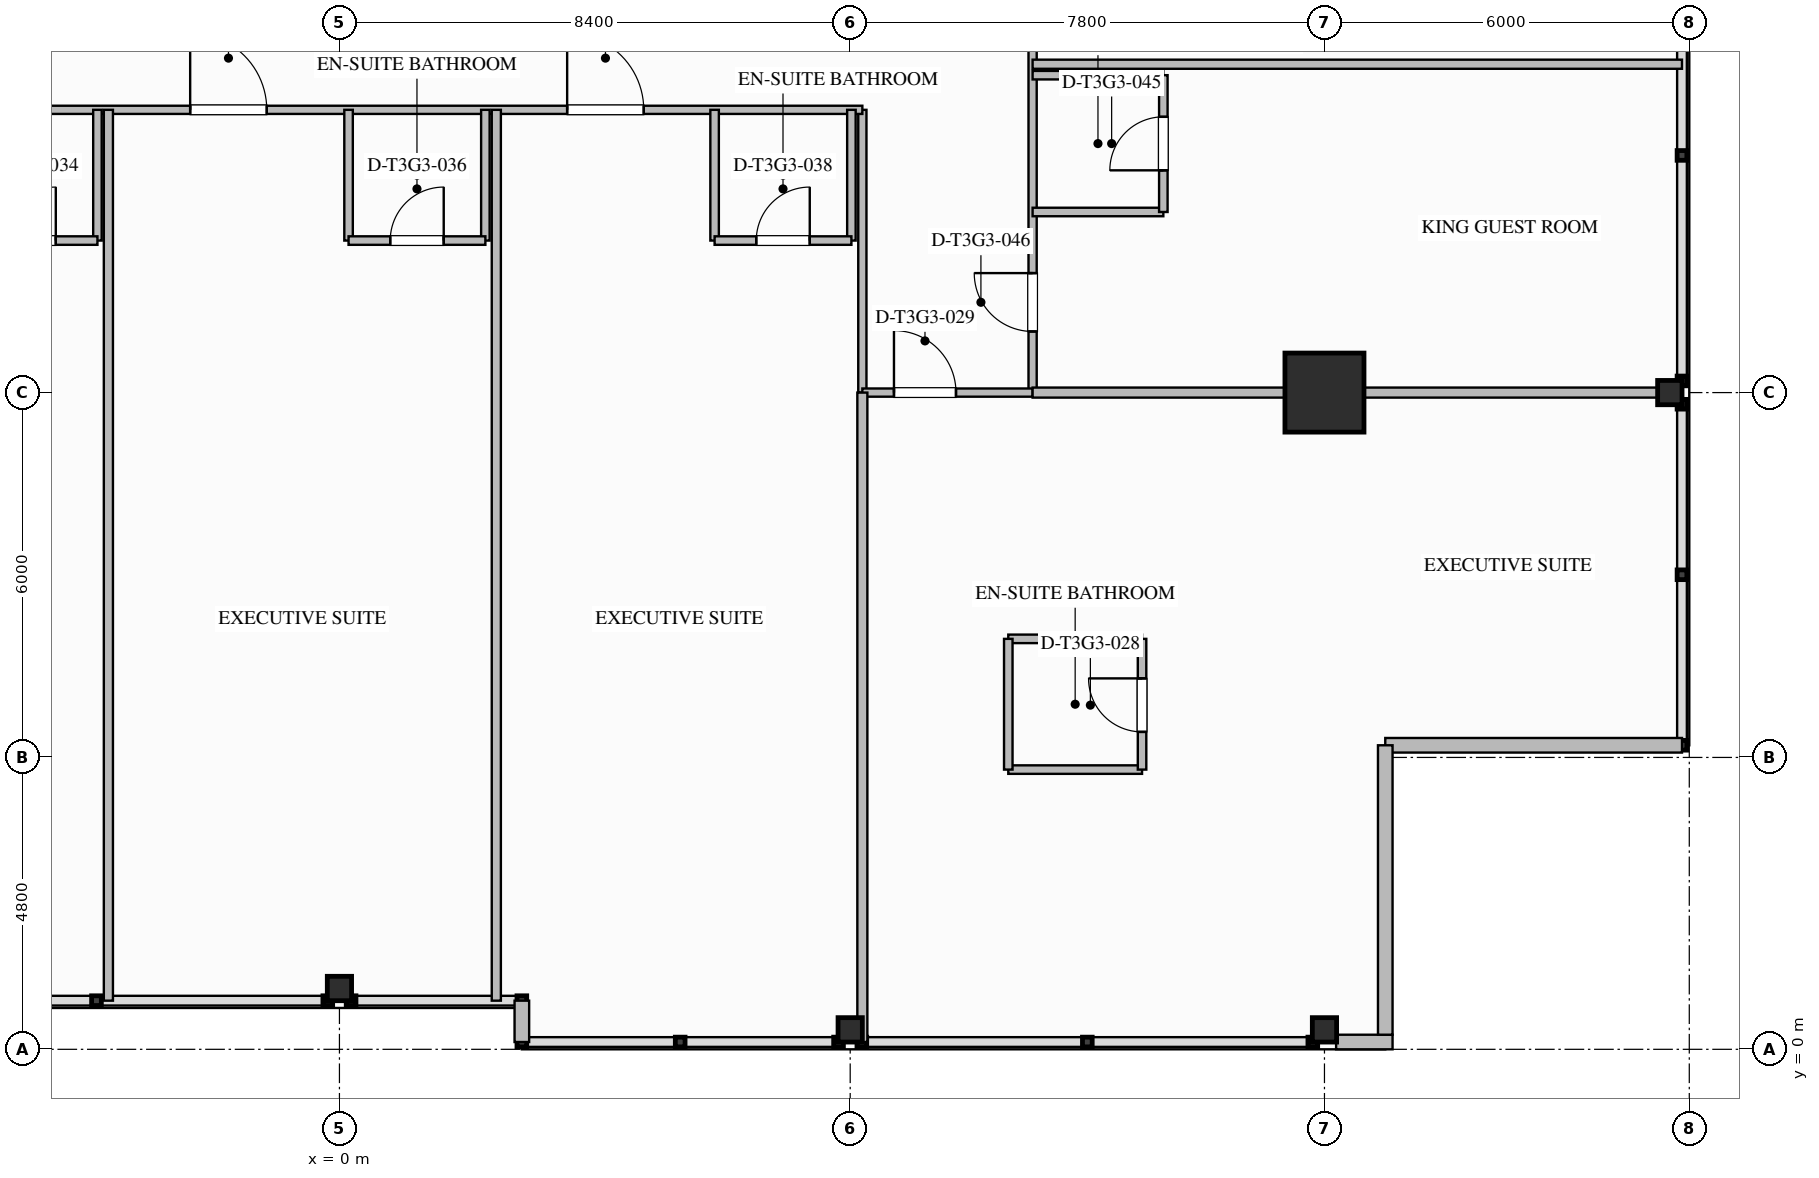
"""IFC4 building model, lengths in metres.
Left out: names, types, materials, properties, quantities, classifications, styles, units other than length and angle.
Written with IfcOpenShell. Run it as: python <this file> out.ifc"""

import sys

from ifc_helpers import new_model, si_unit, direction, frame, frame_2d, origin, origin_2d, place, context, subcontext, project, spatial, rectangle, i_section, extrude, element, fill, save


model = new_model("IFC4")
c1 = context("Model", 3, precision=1e-05, world=origin(), true_north=direction((0.0, 1.0)))
c2 = subcontext(c1, "Body", "Model", "MODEL_VIEW")
j1 = project(units=[si_unit("LENGTHUNIT", "METRE"), si_unit("PLANEANGLEUNIT", "RADIAN")], contexts=[c1])
p1 = place(None, origin())
s1 = spatial("IfcSite", under=j1, at=p1, CompositionType="ELEMENT")
p2 = place(p1, origin())
s2 = spatial("IfcBuilding", under=s1, at=p2, CompositionType="ELEMENT")
p3 = place(p2, frame((0.0, 0.0, 178.8)))
s3 = spatial("IfcBuildingStorey", under=s2, at=p3, CompositionType="ELEMENT", Elevation=178.8)
p4 = place(p3, frame((16.2, 10.8, 0.0), z_axis=(0.0, 0.0, 1.0), x_axis=(1.0, 0.0, 0.0)))
e1 = element("IfcColumn", 1, at=p4, inside=s3, PredefinedType="COLUMN", context=c2, shape_type="SweptSolid", body=[
    extrude(rectangle(XDim=1.3, YDim=1.3, at=origin_2d()), origin(), (0.0, 0.0, 1.0), 3.55),
])
for number, where, z_axis, x_axis in (
    (2, (21.88, 10.8, 0.0), (0.0, 0.0, 1.0), (1.0, 0.0, 0.0)),
    (3, (0.0, 1.0, 0.0), (0.0, 0.0, 1.0), (0.0, 1.0, 0.0)),
    (4, (8.4, 0.32, 0.0), (0.0, 0.0, 1.0), (0.0, 1.0, 0.0)),
    (5, (16.2, 0.32, 0.0), (0.0, 0.0, 1.0), (0.0, 1.0, 0.0)),
):
    element("IfcColumn", number, at=place(p3, frame(where, z_axis=z_axis, x_axis=x_axis)), inside=s3, PredefinedType="COLUMN", context=c2, shape_type="SweptSolid", body=[
        extrude(i_section(OverallWidth=0.401, OverallDepth=0.399, WebThickness=0.025, FlangeThickness=0.04, FilletRadius=0.025, at=origin_2d()), origin(), (0.0, 0.0, 1.0), 3.547),
    ])
p5 = place(p3, frame((17.32, 0.12, 0.0), z_axis=(0.0, 0.0, 1.0), x_axis=(-1.0, 0.0, 0.0)))
e6 = element("IfcWall", 6, at=p5, inside=s3, PredefinedType="STANDARD", context=c2, shape_type="SweptSolid", body=[
    extrude(rectangle(XDim=0.928, YDim=0.24, at=frame_2d((0.464, 0.0))), origin(), (0.0, 0.0, 1.0), 3.29),
])
p6 = place(p3, frame((22.08, 5.0, 0.0), z_axis=(0.0, 0.0, 1.0), x_axis=(-1.0, 0.0, 0.0)))
e7 = element("IfcWall", 7, at=p6, inside=s3, PredefinedType="STANDARD", context=c2, shape_type="SweptSolid", body=[
    extrude(rectangle(XDim=4.88, YDim=0.24, at=frame_2d((2.44, 0.0))), origin(), (0.0, 0.0, 1.0), 3.29),
])
p7 = place(p3, frame((17.2, 5.0, 0.0), z_axis=(0.0, 0.0, 1.0), x_axis=(0.0, -1.0, 0.0)))
e8 = element("IfcWall", 8, at=p7, inside=s3, PredefinedType="STANDARD", context=c2, shape_type="SweptSolid", body=[
    extrude(rectangle(XDim=4.76, YDim=0.24, at=frame_2d((2.38, 0.0))), origin(), (0.0, 0.0, 1.0), 3.29),
])
p8 = place(p3, frame((3.0, 0.12, 0.0), z_axis=(0.0, 0.0, 1.0), x_axis=(0.0, 1.0, 0.0)))
e9 = element("IfcWall", 9, at=p8, inside=s3, PredefinedType="STANDARD", context=c2, shape_type="SweptSolid", body=[
    extrude(rectangle(XDim=0.68, YDim=0.24, at=frame_2d((0.34, 0.0))), origin(), (0.0, 0.0, 1.0), 3.29),
])
p9 = place(p3, frame((8.6, 10.8, 0.0), z_axis=(0.0, 0.0, 1.0), x_axis=(0.0, 1.0, 0.0)))
e10 = element("IfcWall", 10, at=p9, inside=s3, PredefinedType="PARTITIONING", context=c2, shape_type="SweptSolid", body=[
    extrude(rectangle(XDim=4.65, YDim=0.135, at=frame_2d((2.325, 0.0))), origin(), (0.0, 0.0, 1.0), 2.667),
])
p10 = place(p3, frame((-16.2, 15.45, 0.0), z_axis=(0.0, 0.0, 1.0), x_axis=(1.0, 0.0, 0.0)))
e11 = element("IfcWall", 11, at=p10, inside=s3, PredefinedType="PARTITIONING", context=c2, shape_type="SweptSolid", body=[
    extrude(rectangle(XDim=24.8, YDim=0.135, at=frame_2d((12.4, 0.0))), origin(), (0.0, 0.0, 1.0), 3.29),
])
p11 = place(p10, frame((1.875, 0.0, 0.0)))
e12 = element("IfcOpeningElement", 12, at=p11, cuts=e11, PredefinedType="OPENING", context=c2, shape_type="SweptSolid", body=[
    extrude(rectangle(XDim=1.26, YDim=2.2, at=frame_2d((0.63, 1.1))), frame((0.0, 0.077, 0.0), z_axis=(0.0, -1.0, 0.0), x_axis=(1.0, 0.0, 0.0)), (0.0, 0.0, 1.0), 0.155),
])
p12 = place(p10, frame((8.225, 0.0, 0.0)))
e13 = element("IfcOpeningElement", 13, at=p12, cuts=e11, PredefinedType="OPENING", context=c2, shape_type="SweptSolid", body=[
    extrude(rectangle(XDim=0.96, YDim=2.15, at=frame_2d((0.48, 1.075))), frame((0.0, 0.077, 0.0), z_axis=(0.0, -1.0, 0.0), x_axis=(1.0, 0.0, 0.0)), (0.0, 0.0, 1.0), 0.155),
])
p13 = place(p10, frame((13.745, 0.0, 0.0)))
e14 = element("IfcOpeningElement", 14, at=p13, cuts=e11, PredefinedType="OPENING", context=c2, shape_type="SweptSolid", body=[
    extrude(rectangle(XDim=1.26, YDim=2.2, at=frame_2d((0.63, 1.1))), frame((0.0, 0.077, 0.0), z_axis=(0.0, -1.0, 0.0), x_axis=(1.0, 0.0, 0.0)), (0.0, 0.0, 1.0), 0.155),
])
p14 = place(p10, frame((19.945, 0.0, 0.0)))
e15 = element("IfcOpeningElement", 15, at=p14, cuts=e11, PredefinedType="OPENING", context=c2, shape_type="SweptSolid", body=[
    extrude(rectangle(XDim=1.26, YDim=2.2, at=frame_2d((0.63, 1.1))), frame((0.0, 0.077, 0.0), z_axis=(0.0, -1.0, 0.0), x_axis=(1.0, 0.0, 0.0)), (0.0, 0.0, 1.0), 0.155),
])
p15 = place(p3, frame((11.4, 10.8, 0.0), z_axis=(0.0, 0.0, 1.0), x_axis=(0.0, 1.0, 0.0)))
e16 = element("IfcWall", 16, at=p15, inside=s3, PredefinedType="PARTITIONING", context=c2, shape_type="SweptSolid", body=[
    extrude(rectangle(XDim=32.4, YDim=0.135, at=frame_2d((16.2, 0.0))), origin(), (0.0, 0.0, 1.0), 3.29),
])
p16 = place(p15, frame((1.005, 0.0, 0.0)))
e17 = element("IfcOpeningElement", 17, at=p16, cuts=e16, PredefinedType="OPENING", context=c2, shape_type="SweptSolid", body=[
    extrude(rectangle(XDim=0.96, YDim=2.15, at=frame_2d((0.48, 1.075))), frame((0.0, 0.077, 0.0), z_axis=(0.0, -1.0, 0.0), x_axis=(1.0, 0.0, 0.0)), (0.0, 0.0, 1.0), 0.155),
])
p17 = place(p15, frame((8.94, 0.0, 0.0)))
e18 = element("IfcOpeningElement", 18, at=p17, cuts=e16, PredefinedType="OPENING", context=c2, shape_type="SweptSolid", body=[
    extrude(rectangle(XDim=1.02, YDim=2.15, at=frame_2d((0.51, 1.075))), frame((0.0, 0.077, 0.0), z_axis=(0.0, -1.0, 0.0), x_axis=(1.0, 0.0, 0.0)), (0.0, 0.0, 1.0), 0.155),
])
p18 = place(p15, frame((14.445, 0.0, 0.0)))
e19 = element("IfcOpeningElement", 19, at=p18, cuts=e16, PredefinedType="OPENING", context=c2, shape_type="SweptSolid", body=[
    extrude(rectangle(XDim=0.96, YDim=2.15, at=frame_2d((0.48, 1.075))), frame((0.0, 0.077, 0.0), z_axis=(0.0, -1.0, 0.0), x_axis=(1.0, 0.0, 0.0)), (0.0, 0.0, 1.0), 0.155),
])
p19 = place(p15, frame((22.38, 0.0, 0.0)))
e20 = element("IfcOpeningElement", 20, at=p19, cuts=e16, PredefinedType="OPENING", context=c2, shape_type="SweptSolid", body=[
    extrude(rectangle(XDim=1.02, YDim=2.15, at=frame_2d((0.51, 1.075))), frame((0.0, 0.077, 0.0), z_axis=(0.0, -1.0, 0.0), x_axis=(1.0, 0.0, 0.0)), (0.0, 0.0, 1.0), 0.155),
])
p20 = place(p15, frame((28.005, 0.0, 0.0)))
e21 = element("IfcOpeningElement", 21, at=p20, cuts=e16, PredefinedType="OPENING", context=c2, shape_type="SweptSolid", body=[
    extrude(rectangle(XDim=0.96, YDim=2.15, at=frame_2d((0.48, 1.075))), frame((0.0, 0.077, 0.0), z_axis=(0.0, -1.0, 0.0), x_axis=(1.0, 0.0, 0.0)), (0.0, 0.0, 1.0), 0.155),
])
p21 = place(p3, frame((8.6, 10.8, 0.0), z_axis=(0.0, 0.0, 1.0), x_axis=(1.0, 0.0, 0.0)))
e22 = element("IfcWall", 22, at=p21, inside=s3, PredefinedType="PARTITIONING", context=c2, shape_type="SweptSolid", body=[
    extrude(rectangle(XDim=2.8, YDim=0.135, at=frame_2d((1.4, 0.0))), origin(), (0.0, 0.0, 1.0), 2.58),
])
p22 = place(p21, frame((0.52, 0.0, 0.0)))
e23 = element("IfcOpeningElement", 23, at=p22, cuts=e22, PredefinedType="OPENING", context=c2, shape_type="SweptSolid", body=[
    extrude(rectangle(XDim=1.02, YDim=2.15, at=frame_2d((0.51, 1.075))), frame((0.0, 0.077, 0.0), z_axis=(0.0, -1.0, 0.0), x_axis=(1.0, 0.0, 0.0)), (0.0, 0.0, 1.0), 0.155),
])
p23 = place(p3, frame((8.6, 0.12, 0.0), z_axis=(0.0, 0.0, 1.0), x_axis=(0.0, 1.0, 0.0)))
e24 = element("IfcWall", 24, at=p23, inside=s3, PredefinedType="PARTITIONING", context=c2, shape_type="SweptSolid", body=[
    extrude(rectangle(XDim=10.68, YDim=0.165, at=frame_2d((5.34, 0.0))), origin(), (0.0, 0.0, 1.0), 2.58),
])
p24 = place(p3, frame((11.4, 10.8, 0.0), z_axis=(0.0, 0.0, 1.0), x_axis=(1.0, 0.0, 0.0)))
e25 = element("IfcWall", 25, at=p24, inside=s3, PredefinedType="PARTITIONING", context=c2, shape_type="SweptSolid", body=[
    extrude(rectangle(XDim=10.68, YDim=0.165, at=frame_2d((5.34, 0.0))), origin(), (0.0, 0.0, 1.0), 2.58),
])
for number, where, z_axis, x_axis in (
    (26, (11.0, 4.6, 0.0), (0.0, 0.0, 1.0), (1.0, 0.0, 0.0)),
    (27, (11.0, 6.75, 0.0), (0.0, 0.0, 1.0), (1.0, 0.0, 0.0)),
):
    element("IfcWall", number, at=place(p3, frame(where, z_axis=z_axis, x_axis=x_axis)), inside=s3, PredefinedType="PLUMBINGWALL", context=c2, shape_type="SweptSolid", body=[
        extrude(rectangle(XDim=2.2, YDim=0.14, at=frame_2d((1.1, 0.0))), origin(), (0.0, 0.0, 1.0), 3.29),
    ])
p25 = place(p3, frame((11.0, 4.6, 0.0), z_axis=(0.0, 0.0, 1.0), x_axis=(0.0, 1.0, 0.0)))
e28 = element("IfcWall", 28, at=p25, inside=s3, PredefinedType="PLUMBINGWALL", context=c2, shape_type="SweptSolid", body=[
    extrude(rectangle(XDim=2.15, YDim=0.14, at=frame_2d((1.075, 0.0))), origin(), (0.0, 0.0, 1.0), 3.29),
])
p26 = place(p3, frame((13.2, 4.6, 0.0), z_axis=(0.0, 0.0, 1.0), x_axis=(0.0, 1.0, 0.0)))
e29 = element("IfcWall", 29, at=p26, inside=s3, PredefinedType="PLUMBINGWALL", context=c2, shape_type="SweptSolid", body=[
    extrude(rectangle(XDim=2.15, YDim=0.14, at=frame_2d((1.075, 0.0))), origin(), (0.0, 0.0, 1.0), 3.29),
])
p27 = place(p26, frame((0.62, 0.0, 0.0)))
e30 = element("IfcOpeningElement", 30, at=p27, cuts=e29, PredefinedType="OPENING", context=c2, shape_type="SweptSolid", body=[
    extrude(rectangle(XDim=0.88, YDim=2.1, at=frame_2d((0.44, 1.05))), frame((0.0, 0.08, 0.0), z_axis=(0.0, -1.0, 0.0), x_axis=(1.0, 0.0, 0.0)), (0.0, 0.0, 1.0), 0.16),
])
p28 = place(p3, frame((-3.98, 15.45, 0.0), z_axis=(0.0, 0.0, 1.0), x_axis=(0.0, -1.0, 0.0)))
e31 = element("IfcWall", 31, at=p28, inside=s3, PredefinedType="PLUMBINGWALL", context=c2, shape_type="SweptSolid", body=[
    extrude(rectangle(XDim=2.15, YDim=0.14, at=frame_2d((1.075, 0.0))), origin(), (0.0, 0.0, 1.0), 3.29),
])
p29 = place(p3, frame((-6.23, 13.3, 0.0), z_axis=(0.0, 0.0, 1.0), x_axis=(1.0, 0.0, 0.0)))
e32 = element("IfcWall", 32, at=p29, inside=s3, PredefinedType="PLUMBINGWALL", context=c2, shape_type="SweptSolid", body=[
    extrude(rectangle(XDim=2.25, YDim=0.14, at=frame_2d((1.125, 0.0))), origin(), (0.0, 0.0, 1.0), 3.29),
])
p30 = place(p29, frame((0.685, 0.0, 0.0)))
e33 = element("IfcOpeningElement", 33, at=p30, cuts=e32, PredefinedType="OPENING", context=c2, shape_type="SweptSolid", body=[
    extrude(rectangle(XDim=0.88, YDim=2.1, at=frame_2d((0.44, 1.05))), frame((0.0, 0.08, 0.0), z_axis=(0.0, -1.0, 0.0), x_axis=(1.0, 0.0, 0.0)), (0.0, 0.0, 1.0), 0.16),
])
p31 = place(p3, frame((-3.8, 0.8, 0.0), z_axis=(0.0, 0.0, 1.0), x_axis=(0.0, 1.0, 0.0)))
e34 = element("IfcWall", 34, at=p31, inside=s3, PredefinedType="PARTITIONING", context=c2, shape_type="SweptSolid", body=[
    extrude(rectangle(XDim=14.65, YDim=0.15, at=frame_2d((7.325, 0.0))), origin(), (0.0, 0.0, 1.0), 3.29),
])
p32 = place(p3, frame((0.15, 15.45, 0.0), z_axis=(0.0, 0.0, 1.0), x_axis=(0.0, -1.0, 0.0)))
e35 = element("IfcWall", 35, at=p32, inside=s3, PredefinedType="PLUMBINGWALL", context=c2, shape_type="SweptSolid", body=[
    extrude(rectangle(XDim=2.15, YDim=0.14, at=frame_2d((1.075, 0.0))), origin(), (0.0, 0.0, 1.0), 2.667),
])
p33 = place(p3, frame((2.4, 15.45, 0.0), z_axis=(0.0, 0.0, 1.0), x_axis=(0.0, -1.0, 0.0)))
e36 = element("IfcWall", 36, at=p33, inside=s3, PredefinedType="PLUMBINGWALL", context=c2, shape_type="SweptSolid", body=[
    extrude(rectangle(XDim=2.15, YDim=0.14, at=frame_2d((1.075, 0.0))), origin(), (0.0, 0.0, 1.0), 3.29),
])
p34 = place(p3, frame((0.15, 13.3, 0.0), z_axis=(0.0, 0.0, 1.0), x_axis=(1.0, 0.0, 0.0)))
e37 = element("IfcWall", 37, at=p34, inside=s3, PredefinedType="PLUMBINGWALL", context=c2, shape_type="SweptSolid", body=[
    extrude(rectangle(XDim=2.25, YDim=0.14, at=frame_2d((1.125, 0.0))), origin(), (0.0, 0.0, 1.0), 3.29),
])
p35 = place(p34, frame((0.685, 0.0, 0.0)))
e38 = element("IfcOpeningElement", 38, at=p35, cuts=e37, PredefinedType="OPENING", context=c2, shape_type="SweptSolid", body=[
    extrude(rectangle(XDim=0.88, YDim=2.1, at=frame_2d((0.44, 1.05))), frame((0.0, 0.08, 0.0), z_axis=(0.0, -1.0, 0.0), x_axis=(1.0, 0.0, 0.0)), (0.0, 0.0, 1.0), 0.16),
])
p36 = place(p3, frame((2.58, 0.8, 0.0), z_axis=(0.0, 0.0, 1.0), x_axis=(0.0, 1.0, 0.0)))
e39 = element("IfcWall", 39, at=p36, inside=s3, PredefinedType="PARTITIONING", context=c2, shape_type="SweptSolid", body=[
    extrude(rectangle(XDim=14.65, YDim=0.15, at=frame_2d((7.325, 0.0))), origin(), (0.0, 0.0, 1.0), 3.29),
])
p37 = place(p3, frame((6.17, 15.45, 0.0), z_axis=(0.0, 0.0, 1.0), x_axis=(0.0, -1.0, 0.0)))
e40 = element("IfcWall", 40, at=p37, inside=s3, PredefinedType="PLUMBINGWALL", context=c2, shape_type="SweptSolid", body=[
    extrude(rectangle(XDim=2.15, YDim=0.14, at=frame_2d((1.075, 0.0))), origin(), (0.0, 0.0, 1.0), 3.29),
])
p38 = place(p3, frame((8.42, 15.45, 0.0), z_axis=(0.0, 0.0, 1.0), x_axis=(0.0, -1.0, 0.0)))
e41 = element("IfcWall", 41, at=p38, inside=s3, PredefinedType="PLUMBINGWALL", context=c2, shape_type="SweptSolid", body=[
    extrude(rectangle(XDim=2.15, YDim=0.14, at=frame_2d((1.075, 0.0))), origin(), (0.0, 0.0, 1.0), 2.667),
])
p39 = place(p3, frame((6.17, 13.3, 0.0), z_axis=(0.0, 0.0, 1.0), x_axis=(1.0, 0.0, 0.0)))
e42 = element("IfcWall", 42, at=p39, inside=s3, PredefinedType="PLUMBINGWALL", context=c2, shape_type="SweptSolid", body=[
    extrude(rectangle(XDim=2.25, YDim=0.14, at=frame_2d((1.125, 0.0))), origin(), (0.0, 0.0, 1.0), 3.29),
])
p40 = place(p39, frame((0.685, 0.0, 0.0)))
e43 = element("IfcOpeningElement", 43, at=p40, cuts=e42, PredefinedType="OPENING", context=c2, shape_type="SweptSolid", body=[
    extrude(rectangle(XDim=0.88, YDim=2.1, at=frame_2d((0.44, 1.05))), frame((0.0, 0.08, 0.0), z_axis=(0.0, -1.0, 0.0), x_axis=(1.0, 0.0, 0.0)), (0.0, 0.0, 1.0), 0.16),
])
for number, where, z_axis, x_axis in (
    (44, (11.4, 13.77, 0.0), (0.0, 0.0, 1.0), (1.0, 0.0, 0.0)),
    (45, (11.4, 16.02, 0.0), (0.0, 0.0, 1.0), (1.0, 0.0, 0.0)),
):
    element("IfcWall", number, at=place(p3, frame(where, z_axis=z_axis, x_axis=x_axis)), inside=s3, PredefinedType="PLUMBINGWALL", context=c2, shape_type="SweptSolid", body=[
        extrude(rectangle(XDim=2.15, YDim=0.14, at=frame_2d((1.075, 0.0))), origin(), (0.0, 0.0, 1.0), 3.29),
    ])
p41 = place(p3, frame((13.55, 13.77, 0.0), z_axis=(0.0, 0.0, 1.0), x_axis=(0.0, 1.0, 0.0)))
e46 = element("IfcWall", 46, at=p41, inside=s3, PredefinedType="PLUMBINGWALL", context=c2, shape_type="SweptSolid", body=[
    extrude(rectangle(XDim=2.25, YDim=0.14, at=frame_2d((1.125, 0.0))), origin(), (0.0, 0.0, 1.0), 3.29),
])
p42 = place(p41, frame((0.685, 0.0, 0.0)))
e47 = element("IfcOpeningElement", 47, at=p42, cuts=e46, PredefinedType="OPENING", context=c2, shape_type="SweptSolid", body=[
    extrude(rectangle(XDim=0.88, YDim=2.1, at=frame_2d((0.44, 1.05))), frame((0.0, 0.08, 0.0), z_axis=(0.0, -1.0, 0.0), x_axis=(1.0, 0.0, 0.0)), (0.0, 0.0, 1.0), 0.16),
])
p43 = place(p3, frame((11.4, 16.2, 0.0), z_axis=(0.0, 0.0, 1.0), x_axis=(1.0, 0.0, 0.0)))
e48 = element("IfcWall", 48, at=p43, inside=s3, PredefinedType="PARTITIONING", context=c2, shape_type="SweptSolid", body=[
    extrude(rectangle(XDim=10.68, YDim=0.15, at=frame_2d((5.34, 0.0))), origin(), (0.0, 0.0, 1.0), 3.29),
])
p44 = place(p27, origin())
e49 = element("IfcDoor", 49, at=p44, inside=s3, OperationType="SINGLE_SWING_RIGHT", PredefinedType="DOOR", context=c2, shape_type="SweptSolid", body=[
    extrude(rectangle(XDim=0.88, YDim=2.1, at=frame_2d((0.44, 1.05))), frame((0.0, 0.025, 0.0), z_axis=(0.0, -1.0, 0.0), x_axis=(1.0, 0.0, 0.0)), (0.0, 0.0, 1.0), 0.05),
])
fill(e30, e49)
p45 = place(p22, origin())
e50 = element("IfcDoor", 50, at=p45, inside=s3, OperationType="SINGLE_SWING_LEFT", PredefinedType="DOOR", context=c2, shape_type="SweptSolid", body=[
    extrude(rectangle(XDim=1.02, YDim=2.15, at=frame_2d((0.51, 1.075))), frame((0.0, 0.025, 0.0), z_axis=(0.0, -1.0, 0.0), x_axis=(1.0, 0.0, 0.0)), (0.0, 0.0, 1.0), 0.05),
])
fill(e23, e50)
p46 = place(p30, origin())
e51 = element("IfcDoor", 51, at=p46, inside=s3, OperationType="SINGLE_SWING_RIGHT", PredefinedType="DOOR", context=c2, shape_type="SweptSolid", body=[
    extrude(rectangle(XDim=0.88, YDim=2.1, at=frame_2d((0.44, 1.05))), frame((0.0, 0.025, 0.0), z_axis=(0.0, -1.0, 0.0), x_axis=(1.0, 0.0, 0.0)), (0.0, 0.0, 1.0), 0.05),
])
fill(e33, e51)
p47 = place(p35, origin())
e52 = element("IfcDoor", 52, at=p47, inside=s3, OperationType="SINGLE_SWING_RIGHT", PredefinedType="DOOR", context=c2, shape_type="SweptSolid", body=[
    extrude(rectangle(XDim=0.88, YDim=2.1, at=frame_2d((0.44, 1.05))), frame((0.0, 0.025, 0.0), z_axis=(0.0, -1.0, 0.0), x_axis=(1.0, 0.0, 0.0)), (0.0, 0.0, 1.0), 0.05),
])
fill(e38, e52)
p48 = place(p13, origin())
e53 = element("IfcDoor", 53, at=p48, inside=s3, OperationType="SINGLE_SWING_LEFT", PredefinedType="DOOR", context=c2, shape_type="SweptSolid", body=[
    extrude(rectangle(XDim=1.26, YDim=2.2, at=frame_2d((0.63, 1.1))), frame((0.0, 0.025, 0.0), z_axis=(0.0, -1.0, 0.0), x_axis=(1.0, 0.0, 0.0)), (0.0, 0.0, 1.0), 0.05),
])
fill(e14, e53)
p49 = place(p40, origin())
e54 = element("IfcDoor", 54, at=p49, inside=s3, OperationType="SINGLE_SWING_RIGHT", PredefinedType="DOOR", context=c2, shape_type="SweptSolid", body=[
    extrude(rectangle(XDim=0.88, YDim=2.1, at=frame_2d((0.44, 1.05))), frame((0.0, 0.025, 0.0), z_axis=(0.0, -1.0, 0.0), x_axis=(1.0, 0.0, 0.0)), (0.0, 0.0, 1.0), 0.05),
])
fill(e43, e54)
p50 = place(p14, origin())
e55 = element("IfcDoor", 55, at=p50, inside=s3, OperationType="SINGLE_SWING_LEFT", PredefinedType="DOOR", context=c2, shape_type="SweptSolid", body=[
    extrude(rectangle(XDim=1.26, YDim=2.2, at=frame_2d((0.63, 1.1))), frame((0.0, 0.025, 0.0), z_axis=(0.0, -1.0, 0.0), x_axis=(1.0, 0.0, 0.0)), (0.0, 0.0, 1.0), 0.05),
])
fill(e15, e55)
p51 = place(p42, origin())
e56 = element("IfcDoor", 56, at=p51, inside=s3, OperationType="SINGLE_SWING_LEFT", PredefinedType="DOOR", context=c2, shape_type="SweptSolid", body=[
    extrude(rectangle(XDim=0.88, YDim=2.1, at=frame_2d((0.44, 1.05))), frame((0.0, 0.025, 0.0), z_axis=(0.0, -1.0, 0.0), x_axis=(1.0, 0.0, 0.0)), (0.0, 0.0, 1.0), 0.05),
])
fill(e47, e56)
p52 = place(p16, origin())
e57 = element("IfcDoor", 57, at=p52, inside=s3, OperationType="SINGLE_SWING_RIGHT", PredefinedType="DOOR", context=c2, shape_type="SweptSolid", body=[
    extrude(rectangle(XDim=0.96, YDim=2.15, at=frame_2d((0.48, 1.075))), frame((0.0, 0.025, 0.0), z_axis=(0.0, -1.0, 0.0), x_axis=(1.0, 0.0, 0.0)), (0.0, 0.0, 1.0), 0.05),
])
fill(e17, e57)
save(model, sys.argv[1])
